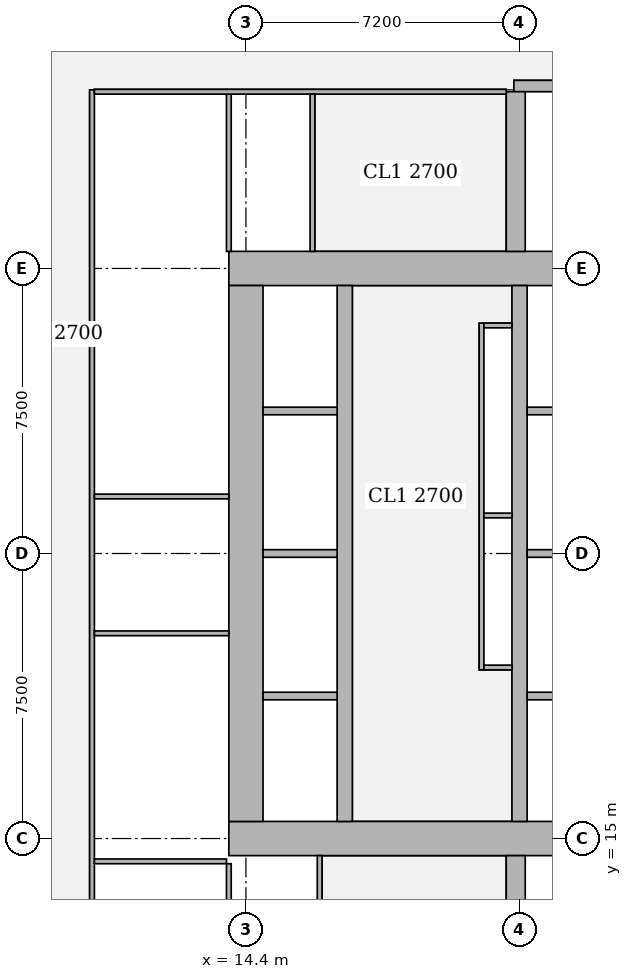
"""IFC4 building model, lengths in metres.
Left out: names, types, materials, properties, quantities, classifications, styles, units other than length and angle.
Written with IfcOpenShell. Run it as: python <this file> out.ifc"""

import sys

from ifc_helpers import new_model, si_unit, direction, frame, frame_2d, origin, place, context, subcontext, project, spatial, rectangle, extrude, element, fill, save


model = new_model("IFC4")
c1 = context("Model", 3, precision=1e-05, world=origin(), true_north=direction((0.0, 1.0)))
c2 = subcontext(c1, "Body", "Model", "MODEL_VIEW")
j1 = project(units=[si_unit("LENGTHUNIT", "METRE"), si_unit("PLANEANGLEUNIT", "RADIAN")], contexts=[c1])
p1 = place(None, origin())
s1 = spatial("IfcSite", under=j1, at=p1, CompositionType="ELEMENT")
p2 = place(p1, origin())
s2 = spatial("IfcBuilding", under=s1, at=p2, CompositionType="ELEMENT")
p3 = place(p2, frame((0.0, 0.0, 89.15)))
s3 = spatial("IfcBuildingStorey", under=s2, at=p3, CompositionType="ELEMENT", Elevation=89.15)
p4 = place(p3, frame((13.95, 15.0, 0.0), z_axis=(0.0, 0.0, 1.0), x_axis=(1.0, 0.0, 0.0)))
e1 = element("IfcWall", 1, at=p4, inside=s3, PredefinedType="SHEAR", context=c2, shape_type="SweptSolid", body=[
    extrude(rectangle(XDim=15.3, YDim=0.9, at=frame_2d((7.65, 0.0))), origin(), (0.0, 0.0, 1.0), 3.75),
])
p5 = place(p4, frame((4.45, 0.0, 0.0)))
e2 = element("IfcOpeningElement", 2, at=p5, cuts=e1, PredefinedType="OPENING", context=c2, shape_type="SweptSolid", body=[
    extrude(rectangle(XDim=1.8, YDim=2.1, at=frame_2d((0.9, 1.05))), frame((0.0, 0.46, 0.0), z_axis=(0.0, -1.0, 0.0), x_axis=(1.0, 0.0, 0.0)), (0.0, 0.0, 1.0), 0.92),
])
p6 = place(p4, frame((10.7, 0.0, 0.0)))
e3 = element("IfcOpeningElement", 3, at=p6, cuts=e1, PredefinedType="OPENING", context=c2, shape_type="SweptSolid", body=[
    extrude(rectangle(XDim=1.1, YDim=2.1, at=frame_2d((0.55, 1.05))), frame((0.0, 0.46, 0.0), z_axis=(0.0, -1.0, 0.0), x_axis=(1.0, 0.0, 0.0)), (0.0, 0.0, 1.0), 0.92),
])
p7 = place(p3, frame((13.95, 30.0, 0.0), z_axis=(0.0, 0.0, 1.0), x_axis=(1.0, 0.0, 0.0)))
e4 = element("IfcWall", 4, at=p7, inside=s3, PredefinedType="SHEAR", context=c2, shape_type="SweptSolid", body=[
    extrude(rectangle(XDim=15.3, YDim=0.9, at=frame_2d((7.65, 0.0))), origin(), (0.0, 0.0, 1.0), 3.75),
])
p8 = place(p7, frame((4.45, 0.0, 0.0)))
e5 = element("IfcOpeningElement", 5, at=p8, cuts=e4, PredefinedType="OPENING", context=c2, shape_type="SweptSolid", body=[
    extrude(rectangle(XDim=1.8, YDim=2.1, at=frame_2d((0.9, 1.05))), frame((0.0, 0.46, 0.0), z_axis=(0.0, -1.0, 0.0), x_axis=(1.0, 0.0, 0.0)), (0.0, 0.0, 1.0), 0.92),
])
p9 = place(p7, frame((10.7, 0.0, 0.0)))
e6 = element("IfcOpeningElement", 6, at=p9, cuts=e4, PredefinedType="OPENING", context=c2, shape_type="SweptSolid", body=[
    extrude(rectangle(XDim=1.1, YDim=2.1, at=frame_2d((0.55, 1.05))), frame((0.0, 0.46, 0.0), z_axis=(0.0, -1.0, 0.0), x_axis=(1.0, 0.0, 0.0)), (0.0, 0.0, 1.0), 0.92),
])
p10 = place(p3, frame((14.4, 15.45, 0.0), z_axis=(0.0, 0.0, 1.0), x_axis=(0.0, 1.0, 0.0)))
e7 = element("IfcWall", 7, at=p10, inside=s3, PredefinedType="SHEAR", context=c2, shape_type="SweptSolid", body=[
    extrude(rectangle(XDim=14.1, YDim=0.9, at=frame_2d((7.05, 0.0))), origin(), (0.0, 0.0, 1.0), 3.75),
])
p11 = place(p3, frame((17.0, 15.45, 0.0), z_axis=(0.0, 0.0, 1.0), x_axis=(0.0, 1.0, 0.0)))
e8 = element("IfcWall", 8, at=p11, inside=s3, PredefinedType="SHEAR", context=c2, shape_type="SweptSolid", body=[
    extrude(rectangle(XDim=14.1, YDim=0.4, at=frame_2d((7.05, 0.0))), origin(), (0.0, 0.0, 1.0), 3.75),
])
p12 = place(p11, frame((0.875, 0.0, 0.0)))
e9 = element("IfcOpeningElement", 9, at=p12, cuts=e8, PredefinedType="OPENING", context=c2, shape_type="SweptSolid", body=[
    extrude(rectangle(XDim=1.1, YDim=2.1, at=frame_2d((0.55, 1.05))), frame((0.0, 0.21, 0.0), z_axis=(0.0, -1.0, 0.0), x_axis=(1.0, 0.0, 0.0)), (0.0, 0.0, 1.0), 0.42),
])
p13 = place(p11, frame((4.625, 0.0, 0.0)))
e10 = element("IfcOpeningElement", 10, at=p13, cuts=e8, PredefinedType="OPENING", context=c2, shape_type="SweptSolid", body=[
    extrude(rectangle(XDim=1.1, YDim=2.1, at=frame_2d((0.55, 1.05))), frame((0.0, 0.21, 0.0), z_axis=(0.0, -1.0, 0.0), x_axis=(1.0, 0.0, 0.0)), (0.0, 0.0, 1.0), 0.42),
])
p14 = place(p11, frame((8.375, 0.0, 0.0)))
e11 = element("IfcOpeningElement", 11, at=p14, cuts=e8, PredefinedType="OPENING", context=c2, shape_type="SweptSolid", body=[
    extrude(rectangle(XDim=1.1, YDim=2.1, at=frame_2d((0.55, 1.05))), frame((0.0, 0.21, 0.0), z_axis=(0.0, -1.0, 0.0), x_axis=(1.0, 0.0, 0.0)), (0.0, 0.0, 1.0), 0.42),
])
p15 = place(p11, frame((12.125, 0.0, 0.0)))
e12 = element("IfcOpeningElement", 12, at=p15, cuts=e8, PredefinedType="OPENING", context=c2, shape_type="SweptSolid", body=[
    extrude(rectangle(XDim=1.1, YDim=2.1, at=frame_2d((0.55, 1.05))), frame((0.0, 0.21, 0.0), z_axis=(0.0, -1.0, 0.0), x_axis=(1.0, 0.0, 0.0)), (0.0, 0.0, 1.0), 0.42),
])
p16 = place(p3, frame((21.6, 15.45, 0.0), z_axis=(0.0, 0.0, 1.0), x_axis=(0.0, 1.0, 0.0)))
e13 = element("IfcWall", 13, at=p16, inside=s3, PredefinedType="SHEAR", context=c2, shape_type="SweptSolid", body=[
    extrude(rectangle(XDim=14.1, YDim=0.4, at=frame_2d((7.05, 0.0))), origin(), (0.0, 0.0, 1.0), 3.75),
])
p17 = place(p3, frame((21.5, 10.35, 0.0), z_axis=(0.0, 0.0, 1.0), x_axis=(0.0, 1.0, 0.0)))
e14 = element("IfcWall", 14, at=p17, inside=s3, PredefinedType="SHEAR", context=c2, shape_type="SweptSolid", body=[
    extrude(rectangle(XDim=4.2, YDim=0.5, at=frame_2d((2.1, 0.0))), origin(), (0.0, 0.0, 1.0), 3.75),
])
p18 = place(p3, frame((21.45, 34.8, 0.0), z_axis=(0.0, 0.0, 1.0), x_axis=(1.0, 0.0, 0.0)))
e15 = element("IfcWall", 15, at=p18, inside=s3, PredefinedType="SHEAR", context=c2, shape_type="SweptSolid", body=[
    extrude(rectangle(XDim=7.5, YDim=0.3, at=frame_2d((3.75, 0.0))), origin(), (0.0, 0.0, 1.0), 3.75),
])
p19 = place(p18, frame((0.5, 0.0, 0.0)))
e16 = element("IfcOpeningElement", 16, at=p19, cuts=e15, PredefinedType="OPENING", context=c2, shape_type="SweptSolid", body=[
    extrude(rectangle(XDim=1.1, YDim=2.1, at=frame_2d((0.55, 1.05))), frame((0.0, 0.16, 0.0), z_axis=(0.0, -1.0, 0.0), x_axis=(1.0, 0.0, 0.0)), (0.0, 0.0, 1.0), 0.32),
])
p20 = place(p3, frame((21.5, 30.45, 0.0), z_axis=(0.0, 0.0, 1.0), x_axis=(0.0, 1.0, 0.0)))
e17 = element("IfcWall", 17, at=p20, inside=s3, PredefinedType="SHEAR", context=c2, shape_type="SweptSolid", body=[
    extrude(rectangle(XDim=4.2, YDim=0.5, at=frame_2d((2.1, 0.0))), origin(), (0.0, 0.0, 1.0), 3.75),
])
p21 = place(p3, frame((10.35, 10.3, 0.0), z_axis=(0.0, 0.0, 1.0), x_axis=(0.0, 1.0, 0.0)))
e18 = element("IfcWall", 18, at=p21, inside=s3, PredefinedType="PARTITIONING", context=c2, shape_type="SweptSolid", body=[
    extrude(rectangle(XDim=24.4, YDim=0.125, at=frame_2d((12.2, 0.0))), origin(), (0.0, 0.0, 1.0), 3.5),
])
p22 = place(p21, frame((1.55, 0.0, 0.0)))
e19 = element("IfcOpeningElement", 19, at=p22, cuts=e18, PredefinedType="OPENING", context=c2, shape_type="SweptSolid", body=[
    extrude(rectangle(XDim=1.0, YDim=2.1, at=frame_2d((0.5, 1.05))), frame((0.0, 0.073, 0.0), z_axis=(0.0, -1.0, 0.0), x_axis=(1.0, 0.0, 0.0)), (0.0, 0.0, 1.0), 0.145),
])
p23 = place(p21, frame((6.6, 0.0, 0.0)))
e20 = element("IfcOpeningElement", 20, at=p23, cuts=e18, PredefinedType="OPENING", context=c2, shape_type="SweptSolid", body=[
    extrude(rectangle(XDim=1.0, YDim=2.1, at=frame_2d((0.5, 1.05))), frame((0.0, 0.073, 0.0), z_axis=(0.0, -1.0, 0.0), x_axis=(1.0, 0.0, 0.0)), (0.0, 0.0, 1.0), 0.145),
])
p24 = place(p21, frame((11.4, 0.0, 0.0)))
e21 = element("IfcOpeningElement", 21, at=p24, cuts=e18, PredefinedType="OPENING", context=c2, shape_type="SweptSolid", body=[
    extrude(rectangle(XDim=1.0, YDim=2.1, at=frame_2d((0.5, 1.05))), frame((0.0, 0.073, 0.0), z_axis=(0.0, -1.0, 0.0), x_axis=(1.0, 0.0, 0.0)), (0.0, 0.0, 1.0), 0.145),
])
p25 = place(p21, frame((18.55, 0.0, 0.0)))
e22 = element("IfcOpeningElement", 22, at=p25, cuts=e18, PredefinedType="OPENING", context=c2, shape_type="SweptSolid", body=[
    extrude(rectangle(XDim=1.0, YDim=2.1, at=frame_2d((0.5, 1.05))), frame((0.0, 0.073, 0.0), z_axis=(0.0, -1.0, 0.0), x_axis=(1.0, 0.0, 0.0)), (0.0, 0.0, 1.0), 0.145),
])
p26 = place(p3, frame((10.413, 14.4, 0.0), z_axis=(0.0, 0.0, 1.0), x_axis=(1.0, 0.0, 0.0)))
e23 = element("IfcWall", 23, at=p26, inside=s3, PredefinedType="PARTITIONING", context=c2, shape_type="SweptSolid", body=[
    extrude(rectangle(XDim=3.475, YDim=0.125, at=frame_2d((1.737, 0.0))), origin(), (0.0, 0.0, 1.0), 3.5),
])
for number, where, z_axis, x_axis in (
    (24, (10.413, 20.4, 0.0), (0.0, 0.0, 1.0), (1.0, 0.0, 0.0)),
    (25, (10.413, 24.0, 0.0), (0.0, 0.0, 1.0), (1.0, 0.0, 0.0)),
):
    element("IfcWall", number, at=place(p3, frame(where, z_axis=z_axis, x_axis=x_axis)), inside=s3, PredefinedType="PARTITIONING", context=c2, shape_type="SweptSolid", body=[
        extrude(rectangle(XDim=3.537, YDim=0.125, at=frame_2d((1.769, 0.0))), origin(), (0.0, 0.0, 1.0), 3.5),
    ])
p27 = place(p3, frame((13.95, 10.413, 0.0), z_axis=(0.0, 0.0, 1.0), x_axis=(0.0, 1.0, 0.0)))
e26 = element("IfcWall", 26, at=p27, inside=s3, PredefinedType="PARTITIONING", context=c2, shape_type="SweptSolid", body=[
    extrude(rectangle(XDim=3.925, YDim=0.125, at=frame_2d((1.962, 0.0))), origin(), (0.0, 0.0, 1.0), 3.5),
])
p28 = place(p3, frame((13.95, 30.45, 0.0), z_axis=(0.0, 0.0, 1.0), x_axis=(0.0, 1.0, 0.0)))
e27 = element("IfcWall", 27, at=p28, inside=s3, PredefinedType="PARTITIONING", context=c2, shape_type="SweptSolid", body=[
    extrude(rectangle(XDim=4.137, YDim=0.125, at=frame_2d((2.068, 0.0))), origin(), (0.0, 0.0, 1.0), 3.5),
])
p29 = place(p3, frame((10.413, 34.65, 0.0), z_axis=(0.0, 0.0, 1.0), x_axis=(1.0, 0.0, 0.0)))
e28 = element("IfcWall", 28, at=p29, inside=s3, PredefinedType="PARTITIONING", context=c2, shape_type="SweptSolid", body=[
    extrude(rectangle(XDim=10.837, YDim=0.125, at=frame_2d((5.418, 0.0))), origin(), (0.0, 0.0, 1.0), 3.5),
])
p30 = place(p29, frame((7.487, 0.0, 0.0)))
e29 = element("IfcOpeningElement", 29, at=p30, cuts=e28, PredefinedType="OPENING", context=c2, shape_type="SweptSolid", body=[
    extrude(rectangle(XDim=1.8, YDim=2.1, at=frame_2d((0.9, 1.05))), frame((0.0, 0.073, 0.0), z_axis=(0.0, -1.0, 0.0), x_axis=(1.0, 0.0, 0.0)), (0.0, 0.0, 1.0), 0.145),
])
p31 = place(p3, frame((16.34, 10.413, 0.0), z_axis=(0.0, 0.0, 1.0), x_axis=(0.0, 1.0, 0.0)))
e30 = element("IfcWall", 30, at=p31, inside=s3, PredefinedType="PARTITIONING", context=c2, shape_type="SweptSolid", body=[
    extrude(rectangle(XDim=4.137, YDim=0.125, at=frame_2d((2.068, 0.0))), origin(), (0.0, 0.0, 1.0), 3.5),
])
p32 = place(p31, frame((1.512, 0.0, 0.0)))
e31 = element("IfcOpeningElement", 31, at=p32, cuts=e30, PredefinedType="OPENING", context=c2, shape_type="SweptSolid", body=[
    extrude(rectangle(XDim=1.0, YDim=2.1, at=frame_2d((0.5, 1.05))), frame((0.0, 0.073, 0.0), z_axis=(0.0, -1.0, 0.0), x_axis=(1.0, 0.0, 0.0)), (0.0, 0.0, 1.0), 0.145),
])
p33 = place(p3, frame((16.15, 30.45, 0.0), z_axis=(0.0, 0.0, 1.0), x_axis=(0.0, 1.0, 0.0)))
e32 = element("IfcWall", 32, at=p33, inside=s3, PredefinedType="PARTITIONING", context=c2, shape_type="SweptSolid", body=[
    extrude(rectangle(XDim=4.137, YDim=0.125, at=frame_2d((2.068, 0.0))), origin(), (0.0, 0.0, 1.0), 3.5),
])
p34 = place(p33, frame((1.625, 0.0, 0.0)))
e33 = element("IfcOpeningElement", 33, at=p34, cuts=e32, PredefinedType="OPENING", context=c2, shape_type="SweptSolid", body=[
    extrude(rectangle(XDim=1.0, YDim=2.1, at=frame_2d((0.5, 1.05))), frame((0.0, 0.073, 0.0), z_axis=(0.0, -1.0, 0.0), x_axis=(1.0, 0.0, 0.0)), (0.0, 0.0, 1.0), 0.145),
])
p35 = place(p3, frame((20.6, 19.438, 0.0), z_axis=(0.0, 0.0, 1.0), x_axis=(0.0, 1.0, 0.0)))
e34 = element("IfcWall", 34, at=p35, inside=s3, PredefinedType="PARTITIONING", context=c2, shape_type="SweptSolid", body=[
    extrude(rectangle(XDim=9.124, YDim=0.125, at=frame_2d((4.562, 0.0))), origin(), (0.0, 0.0, 1.0), 3.5),
])
p36 = place(p35, frame((1.562, 0.0, 0.0)))
e35 = element("IfcOpeningElement", 35, at=p36, cuts=e34, PredefinedType="OPENING", context=c2, shape_type="SweptSolid", body=[
    extrude(rectangle(XDim=1.0, YDim=2.1, at=frame_2d((0.5, 1.05))), frame((0.0, 0.073, 0.0), z_axis=(0.0, -1.0, 0.0), x_axis=(1.0, 0.0, 0.0)), (0.0, 0.0, 1.0), 0.145),
])
p37 = place(p35, frame((6.062, 0.0, 0.0)))
e36 = element("IfcOpeningElement", 36, at=p37, cuts=e34, PredefinedType="OPENING", context=c2, shape_type="SweptSolid", body=[
    extrude(rectangle(XDim=1.0, YDim=2.1, at=frame_2d((0.5, 1.05))), frame((0.0, 0.073, 0.0), z_axis=(0.0, -1.0, 0.0), x_axis=(1.0, 0.0, 0.0)), (0.0, 0.0, 1.0), 0.145),
])
for number, where, z_axis, x_axis in (
    (37, (20.663, 19.5, 0.0), (0.0, 0.0, 1.0), (1.0, 0.0, 0.0)),
    (38, (20.663, 28.5, 0.0), (0.0, 0.0, 1.0), (1.0, 0.0, 0.0)),
    (39, (20.663, 23.5, 0.0), (0.0, 0.0, 1.0), (1.0, 0.0, 0.0)),
):
    element("IfcWall", number, at=place(p3, frame(where, z_axis=z_axis, x_axis=x_axis)), inside=s3, PredefinedType="PARTITIONING", context=c2, shape_type="SweptSolid", body=[
        extrude(rectangle(XDim=0.737, YDim=0.125, at=frame_2d((0.368, 0.0))), origin(), (0.0, 0.0, 1.0), 3.5),
    ])
p38 = place(p3, frame((14.85, 18.75, 0.0), z_axis=(0.0, 0.0, 1.0), x_axis=(1.0, 0.0, 0.0)))
e40 = element("IfcWall", 40, at=p38, inside=s3, PredefinedType="SOLIDWALL", context=c2, shape_type="SweptSolid", body=[
    extrude(rectangle(XDim=1.95, YDim=0.2, at=frame_2d((0.975, 0.0))), origin(), (0.0, 0.0, 1.0), 3.5),
])
p39 = place(p3, frame((21.8, 18.75, 0.0), z_axis=(0.0, 0.0, 1.0), x_axis=(1.0, 0.0, 0.0)))
e41 = element("IfcWall", 41, at=p39, inside=s3, PredefinedType="SOLIDWALL", context=c2, shape_type="SweptSolid", body=[
    extrude(rectangle(XDim=2.2, YDim=0.2, at=frame_2d((1.1, 0.0))), origin(), (0.0, 0.0, 1.0), 3.5),
])
p40 = place(p3, frame((14.85, 22.5, 0.0), z_axis=(0.0, 0.0, 1.0), x_axis=(1.0, 0.0, 0.0)))
e42 = element("IfcWall", 42, at=p40, inside=s3, PredefinedType="SOLIDWALL", context=c2, shape_type="SweptSolid", body=[
    extrude(rectangle(XDim=1.95, YDim=0.2, at=frame_2d((0.975, 0.0))), origin(), (0.0, 0.0, 1.0), 3.5),
])
p41 = place(p3, frame((21.8, 22.5, 0.0), z_axis=(0.0, 0.0, 1.0), x_axis=(1.0, 0.0, 0.0)))
e43 = element("IfcWall", 43, at=p41, inside=s3, PredefinedType="SOLIDWALL", context=c2, shape_type="SweptSolid", body=[
    extrude(rectangle(XDim=2.2, YDim=0.2, at=frame_2d((1.1, 0.0))), origin(), (0.0, 0.0, 1.0), 3.5),
])
p42 = place(p3, frame((14.85, 26.25, 0.0), z_axis=(0.0, 0.0, 1.0), x_axis=(1.0, 0.0, 0.0)))
e44 = element("IfcWall", 44, at=p42, inside=s3, PredefinedType="SOLIDWALL", context=c2, shape_type="SweptSolid", body=[
    extrude(rectangle(XDim=1.95, YDim=0.2, at=frame_2d((0.975, 0.0))), origin(), (0.0, 0.0, 1.0), 3.5),
])
p43 = place(p3, frame((21.8, 26.25, 0.0), z_axis=(0.0, 0.0, 1.0), x_axis=(1.0, 0.0, 0.0)))
e45 = element("IfcWall", 45, at=p43, inside=s3, PredefinedType="SOLIDWALL", context=c2, shape_type="SweptSolid", body=[
    extrude(rectangle(XDim=2.2, YDim=0.2, at=frame_2d((1.1, 0.0))), origin(), (0.0, 0.0, 1.0), 3.5),
])
p44 = place(p23, origin())
e46 = element("IfcDoor", 46, at=p44, inside=s3, OperationType="SINGLE_SWING_LEFT", PredefinedType="DOOR", context=c2, shape_type="SweptSolid", body=[
    extrude(rectangle(XDim=1.0, YDim=2.1, at=frame_2d((0.5, 1.05))), frame((0.0, 0.025, 0.0), z_axis=(0.0, -1.0, 0.0), x_axis=(1.0, 0.0, 0.0)), (0.0, 0.0, 1.0), 0.05),
])
fill(e20, e46)
p45 = place(p24, origin())
e47 = element("IfcDoor", 47, at=p45, inside=s3, OperationType="SINGLE_SWING_LEFT", PredefinedType="DOOR", context=c2, shape_type="SweptSolid", body=[
    extrude(rectangle(XDim=1.0, YDim=2.1, at=frame_2d((0.5, 1.05))), frame((0.0, 0.025, 0.0), z_axis=(0.0, -1.0, 0.0), x_axis=(1.0, 0.0, 0.0)), (0.0, 0.0, 1.0), 0.05),
])
fill(e21, e47)
p46 = place(p25, origin())
e48 = element("IfcDoor", 48, at=p46, inside=s3, OperationType="SINGLE_SWING_LEFT", PredefinedType="DOOR", context=c2, shape_type="SweptSolid", body=[
    extrude(rectangle(XDim=1.0, YDim=2.1, at=frame_2d((0.5, 1.05))), frame((0.0, 0.025, 0.0), z_axis=(0.0, -1.0, 0.0), x_axis=(1.0, 0.0, 0.0)), (0.0, 0.0, 1.0), 0.05),
])
fill(e22, e48)
p47 = place(p34, origin())
e49 = element("IfcDoor", 49, at=p47, inside=s3, OperationType="SINGLE_SWING_RIGHT", PredefinedType="DOOR", context=c2, shape_type="SweptSolid", body=[
    extrude(rectangle(XDim=1.0, YDim=2.1, at=frame_2d((0.5, 1.05))), frame((0.0, 0.025, 0.0), z_axis=(0.0, -1.0, 0.0), x_axis=(1.0, 0.0, 0.0)), (0.0, 0.0, 1.0), 0.05),
])
fill(e33, e49)
p48 = place(p30, origin())
e50 = element("IfcDoor", 50, at=p48, inside=s3, OperationType="DOUBLE_DOOR_SINGLE_SWING", PredefinedType="DOOR", context=c2, shape_type="SweptSolid", body=[
    extrude(rectangle(XDim=1.8, YDim=2.1, at=frame_2d((0.9, 1.05))), frame((0.0, 0.025, 0.0), z_axis=(0.0, -1.0, 0.0), x_axis=(1.0, 0.0, 0.0)), (0.0, 0.0, 1.0), 0.05),
])
fill(e29, e50)
p49 = place(p36, origin())
e51 = element("IfcDoor", 51, at=p49, inside=s3, OperationType="SINGLE_SWING_LEFT", PredefinedType="DOOR", context=c2, shape_type="SweptSolid", body=[
    extrude(rectangle(XDim=1.0, YDim=2.1, at=frame_2d((0.5, 1.05))), frame((0.0, 0.025, 0.0), z_axis=(0.0, -1.0, 0.0), x_axis=(1.0, 0.0, 0.0)), (0.0, 0.0, 1.0), 0.05),
])
fill(e35, e51)
p50 = place(p37, origin())
e52 = element("IfcDoor", 52, at=p50, inside=s3, OperationType="SINGLE_SWING_RIGHT", PredefinedType="DOOR", context=c2, shape_type="SweptSolid", body=[
    extrude(rectangle(XDim=1.0, YDim=2.1, at=frame_2d((0.5, 1.05))), frame((0.0, 0.025, 0.0), z_axis=(0.0, -1.0, 0.0), x_axis=(1.0, 0.0, 0.0)), (0.0, 0.0, 1.0), 0.05),
])
fill(e36, e52)
p51 = place(p5, origin())
e53 = element("IfcDoor", 53, at=p51, inside=s3, OperationType="DOUBLE_DOOR_SINGLE_SWING", PredefinedType="DOOR", context=c2, shape_type="SweptSolid", body=[
    extrude(rectangle(XDim=1.8, YDim=2.1, at=frame_2d((0.9, 1.05))), frame((0.0, 0.025, 0.0), z_axis=(0.0, -1.0, 0.0), x_axis=(1.0, 0.0, 0.0)), (0.0, 0.0, 1.0), 0.05),
])
fill(e2, e53)
p52 = place(p8, origin())
e54 = element("IfcDoor", 54, at=p52, inside=s3, OperationType="DOUBLE_DOOR_SINGLE_SWING", PredefinedType="DOOR", context=c2, shape_type="SweptSolid", body=[
    extrude(rectangle(XDim=1.8, YDim=2.1, at=frame_2d((0.9, 1.05))), frame((0.0, 0.025, 0.0), z_axis=(0.0, -1.0, 0.0), x_axis=(1.0, 0.0, 0.0)), (0.0, 0.0, 1.0), 0.05),
])
fill(e5, e54)
p53 = place(p12, origin())
e55 = element("IfcDoor", 55, at=p53, inside=s3, OperationType="DOUBLE_DOOR_SLIDING", PredefinedType="DOOR", context=c2, shape_type="SweptSolid", body=[
    extrude(rectangle(XDim=1.1, YDim=2.1, at=frame_2d((0.55, 1.05))), frame((0.0, 0.025, 0.0), z_axis=(0.0, -1.0, 0.0), x_axis=(1.0, 0.0, 0.0)), (0.0, 0.0, 1.0), 0.05),
])
fill(e9, e55)
p54 = place(p13, origin())
e56 = element("IfcDoor", 56, at=p54, inside=s3, OperationType="DOUBLE_DOOR_SLIDING", PredefinedType="DOOR", context=c2, shape_type="SweptSolid", body=[
    extrude(rectangle(XDim=1.1, YDim=2.1, at=frame_2d((0.55, 1.05))), frame((0.0, 0.025, 0.0), z_axis=(0.0, -1.0, 0.0), x_axis=(1.0, 0.0, 0.0)), (0.0, 0.0, 1.0), 0.05),
])
fill(e10, e56)
p55 = place(p14, origin())
e57 = element("IfcDoor", 57, at=p55, inside=s3, OperationType="DOUBLE_DOOR_SLIDING", PredefinedType="DOOR", context=c2, shape_type="SweptSolid", body=[
    extrude(rectangle(XDim=1.1, YDim=2.1, at=frame_2d((0.55, 1.05))), frame((0.0, 0.025, 0.0), z_axis=(0.0, -1.0, 0.0), x_axis=(1.0, 0.0, 0.0)), (0.0, 0.0, 1.0), 0.05),
])
fill(e11, e57)
p56 = place(p15, origin())
e58 = element("IfcDoor", 58, at=p56, inside=s3, OperationType="DOUBLE_DOOR_SLIDING", PredefinedType="DOOR", context=c2, shape_type="SweptSolid", body=[
    extrude(rectangle(XDim=1.1, YDim=2.1, at=frame_2d((0.55, 1.05))), frame((0.0, 0.025, 0.0), z_axis=(0.0, -1.0, 0.0), x_axis=(1.0, 0.0, 0.0)), (0.0, 0.0, 1.0), 0.05),
])
fill(e12, e58)
p57 = place(p19, origin())
e59 = element("IfcDoor", 59, at=p57, inside=s3, OperationType="SINGLE_SWING_RIGHT", PredefinedType="DOOR", context=c2, shape_type="SweptSolid", body=[
    extrude(rectangle(XDim=1.1, YDim=2.1, at=frame_2d((0.55, 1.05))), frame((0.0, 0.025, 0.0), z_axis=(0.0, -1.0, 0.0), x_axis=(1.0, 0.0, 0.0)), (0.0, 0.0, 1.0), 0.05),
])
fill(e16, e59)
save(model, sys.argv[1])
